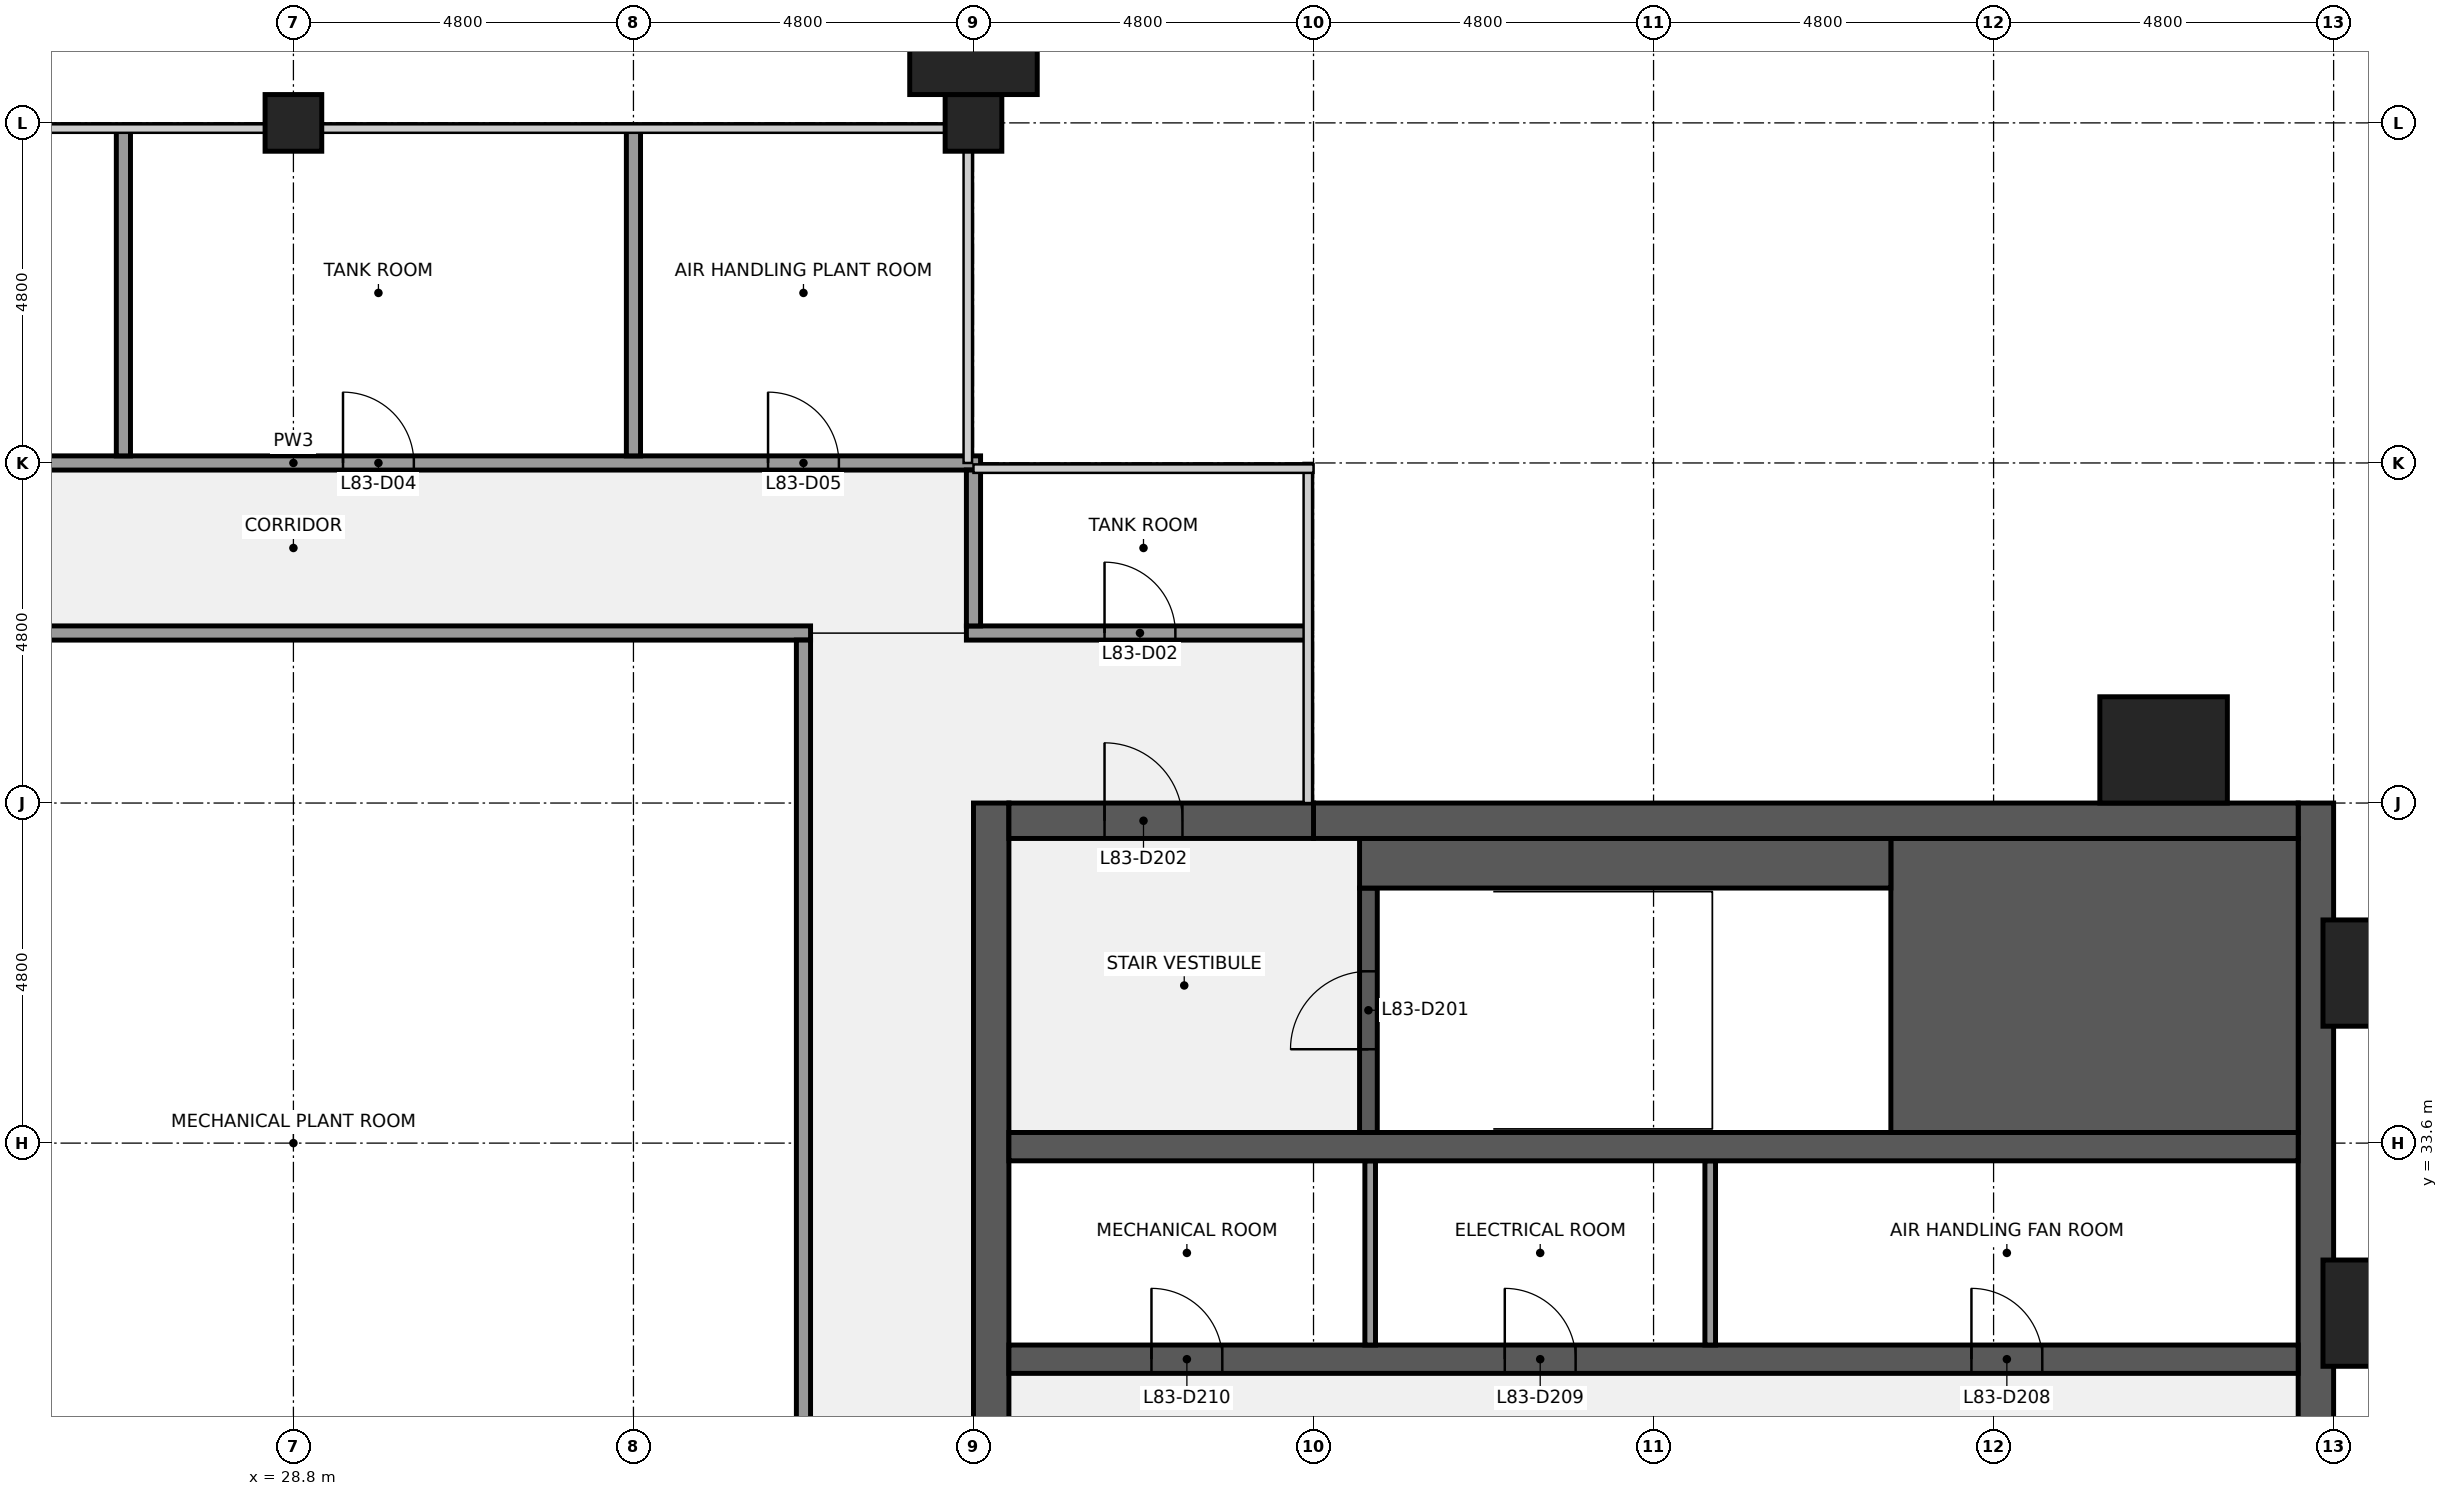
"""IFC4 building model, lengths in metres.
Left out: names, types, materials, properties, quantities, classifications, styles, units other than length and angle.
Written with IfcOpenShell. Run it as: python <this file> out.ifc"""

import sys

from ifc_helpers import new_model, si_unit, direction, frame, frame_2d, origin, origin_2d, place, context, subcontext, project, spatial, polyline, rectangle, outline, extrude, element, fill, save


model = new_model("IFC4")
c1 = context("Model", 3, precision=1e-05, world=origin(), true_north=direction((0.0, 1.0)))
c2 = subcontext(c1, "Body", "Model", "MODEL_VIEW")
j1 = project(units=[si_unit("LENGTHUNIT", "METRE"), si_unit("PLANEANGLEUNIT", "RADIAN")], contexts=[c1])
p1 = place(None, origin())
s1 = spatial("IfcSite", under=j1, at=p1, CompositionType="ELEMENT")
p2 = place(p1, origin())
s2 = spatial("IfcBuilding", under=s1, at=p2, CompositionType="ELEMENT")
p3 = place(p2, frame((0.0, 0.0, 370.3)))
s3 = spatial("IfcBuildingStorey", under=s2, at=p3, CompositionType="ELEMENT", Elevation=370.3)
for number, where, z_axis, x_axis in (
    (1, (28.8, 48.0, 0.0), (0.0, 0.0, 1.0), (1.0, 0.0, 0.0)),
    (2, (38.4, 48.0, 0.0), (0.0, 0.0, 1.0), (1.0, 0.0, 0.0)),
):
    element("IfcColumn", number, at=place(p3, frame(where, z_axis=z_axis, x_axis=x_axis)), inside=s3, PredefinedType="COLUMN", context=c2, shape_type="SweptSolid", body=[
        extrude(rectangle(XDim=0.8, YDim=0.8, at=origin_2d()), origin(), (0.0, 0.0, 1.0), 4.0),
    ])
p4 = place(p3, frame((57.35, 38.4, 0.0), z_axis=(0.0, 0.0, 1.0), x_axis=(0.0, -1.0, 0.0)))
e3 = element("IfcWall", 3, at=p4, inside=s3, PredefinedType="SHEAR", context=c2, shape_type="SweptSolid", body=[
    extrude(outline(polyline([(0.0, 0.0), (28.227, 0.0), (28.227, 2.488), (26.98, 3.75), (0.0, 3.75), (0.0, 0.0)])), frame((0.0, 0.25, 0.0), z_axis=(0.0, -1.0, 0.0), x_axis=(1.0, 0.0, 0.0)), (0.0, 0.0, 1.0), 0.5),
])
p5 = place(p3, frame((38.65, 10.173, 0.0), z_axis=(0.0, 0.0, 1.0), x_axis=(0.0, 1.0, 0.0)))
e4 = element("IfcWall", 4, at=p5, inside=s3, PredefinedType="SHEAR", context=c2, shape_type="SweptSolid", body=[
    extrude(outline(polyline([(0.0, 0.0), (28.227, 0.0), (28.227, 3.75), (1.247, 3.75), (0.0, 2.488), (0.0, 0.0)])), frame((0.0, 0.25, 0.0), z_axis=(0.0, -1.0, 0.0), x_axis=(1.0, 0.0, 0.0)), (0.0, 0.0, 1.0), 0.5),
])
p6 = place(p5, frame((8.127, 0.0, 0.0)))
e5 = element("IfcOpeningElement", 5, at=p6, cuts=e4, PredefinedType="OPENING", context=c2, shape_type="SweptSolid", body=[
    extrude(rectangle(XDim=1.8, YDim=2.1, at=frame_2d((0.9, 1.05))), frame((0.0, 0.26, 0.0), z_axis=(0.0, -1.0, 0.0), x_axis=(1.0, 0.0, 0.0)), (0.0, 0.0, 1.0), 0.52),
])
p7 = place(p5, frame((17.727, 0.0, 0.0)))
e6 = element("IfcOpeningElement", 6, at=p7, cuts=e4, PredefinedType="OPENING", context=c2, shape_type="SweptSolid", body=[
    extrude(rectangle(XDim=1.8, YDim=2.1, at=frame_2d((0.9, 1.05))), frame((0.0, 0.26, 0.0), z_axis=(0.0, -1.0, 0.0), x_axis=(1.0, 0.0, 0.0)), (0.0, 0.0, 1.0), 0.52),
])
p8 = place(p3, frame((38.9, 30.55, 0.0), z_axis=(0.0, 0.0, 1.0), x_axis=(1.0, 0.0, 0.0)))
e7 = element("IfcWall", 7, at=p8, inside=s3, PredefinedType="SHEAR", context=c2, shape_type="SweptSolid", body=[
    extrude(rectangle(XDim=18.2, YDim=0.4, at=frame_2d((9.1, 0.0))), origin(), (0.0, 0.0, 1.0), 3.75),
])
p9 = place(p8, frame((13.587, 0.0, 0.0)))
e8 = element("IfcOpeningElement", 8, at=p9, cuts=e7, PredefinedType="OPENING", context=c2, shape_type="SweptSolid", body=[
    extrude(rectangle(XDim=1.0, YDim=2.1, at=frame_2d((0.5, 1.05))), frame((0.0, 0.21, 0.0), z_axis=(0.0, -1.0, 0.0), x_axis=(1.0, 0.0, 0.0)), (0.0, 0.0, 1.0), 0.42),
])
p10 = place(p8, frame((7.0, 0.0, 0.0)))
e9 = element("IfcOpeningElement", 9, at=p10, cuts=e7, PredefinedType="OPENING", context=c2, shape_type="SweptSolid", body=[
    extrude(rectangle(XDim=1.0, YDim=2.1, at=frame_2d((0.5, 1.05))), frame((0.0, 0.21, 0.0), z_axis=(0.0, -1.0, 0.0), x_axis=(1.0, 0.0, 0.0)), (0.0, 0.0, 1.0), 0.42),
])
p11 = place(p8, frame((2.012, 0.0, 0.0)))
e10 = element("IfcOpeningElement", 10, at=p11, cuts=e7, PredefinedType="OPENING", context=c2, shape_type="SweptSolid", body=[
    extrude(rectangle(XDim=1.0, YDim=2.1, at=frame_2d((0.5, 1.05))), frame((0.0, 0.21, 0.0), z_axis=(0.0, -1.0, 0.0), x_axis=(1.0, 0.0, 0.0)), (0.0, 0.0, 1.0), 0.42),
])
for number, where, z_axis, x_axis in (
    (11, (48.8, 30.75, 0.0), (0.0, 0.0, 1.0), (0.0, 1.0, 0.0)),
    (12, (44.0, 30.75, 0.0), (0.0, 0.0, 1.0), (0.0, 1.0, 0.0)),
):
    element("IfcWall", number, at=place(p3, frame(where, z_axis=z_axis, x_axis=x_axis)), inside=s3, PredefinedType="PARTITIONING", context=c2, shape_type="SweptSolid", body=[
        extrude(rectangle(XDim=2.6, YDim=0.15, at=frame_2d((1.3, 0.0))), origin(), (0.0, 0.0, 1.0), 3.75),
    ])
p12 = place(p3, frame((38.9, 33.55, 0.0), z_axis=(0.0, 0.0, 1.0), x_axis=(1.0, 0.0, 0.0)))
e13 = element("IfcWall", 13, at=p12, inside=s3, PredefinedType="SHEAR", context=c2, shape_type="SweptSolid", body=[
    extrude(rectangle(XDim=18.2, YDim=0.4, at=frame_2d((9.1, 0.0))), origin(), (0.0, 0.0, 1.0), 3.75),
])
p13 = place(p3, frame((51.35, 35.825, 0.0), z_axis=(0.0, 0.0, 1.0), x_axis=(1.0, 0.0, 0.0)))
e14 = element("IfcWall", 14, at=p13, inside=s3, PredefinedType="SHEAR", context=c2, shape_type="SweptSolid", body=[
    extrude(rectangle(XDim=5.75, YDim=4.15, at=frame_2d((2.875, 0.0))), origin(), (0.0, 0.0, 1.0), 3.75),
])
p14 = place(p3, frame((43.975, 33.75, 0.0), z_axis=(0.0, 0.0, 1.0), x_axis=(0.0, 1.0, 0.0)))
e15 = element("IfcWall", 15, at=p14, inside=s3, PredefinedType="SHEAR", context=c2, shape_type="SweptSolid", body=[
    extrude(rectangle(XDim=3.45, YDim=0.25, at=frame_2d((1.725, 0.0))), origin(), (0.0, 0.0, 1.0), 3.75),
])
p15 = place(p14, frame((1.175, 0.0, 0.0)))
e16 = element("IfcOpeningElement", 16, at=p15, cuts=e15, PredefinedType="OPENING", context=c2, shape_type="SweptSolid", body=[
    extrude(rectangle(XDim=1.1, YDim=2.1, at=frame_2d((0.55, 1.05))), frame((0.0, 0.135, 0.0), z_axis=(0.0, -1.0, 0.0), x_axis=(1.0, 0.0, 0.0)), (0.0, 0.0, 1.0), 0.27),
])
p16 = place(p3, frame((43.85, 37.55, 0.0), z_axis=(0.0, 0.0, 1.0), x_axis=(1.0, 0.0, 0.0)))
e17 = element("IfcWall", 17, at=p16, inside=s3, PredefinedType="SHEAR", context=c2, shape_type="SweptSolid", body=[
    extrude(rectangle(XDim=7.5, YDim=0.7, at=frame_2d((3.75, 0.0))), origin(), (0.0, 0.0, 1.0), 3.75),
])
p17 = place(p3, frame((43.2, 38.15, 0.0), z_axis=(0.0, 0.0, 1.0), x_axis=(1.0, 0.0, 0.0)))
e18 = element("IfcWall", 18, at=p17, inside=s3, PredefinedType="SHEAR", context=c2, shape_type="SweptSolid", body=[
    extrude(rectangle(XDim=13.9, YDim=0.5, at=frame_2d((6.95, 0.0))), origin(), (0.0, 0.0, 1.0), 3.75),
])
p18 = place(p3, frame((38.9, 38.15, 0.0), z_axis=(0.0, 0.0, 1.0), x_axis=(1.0, 0.0, 0.0)))
e19 = element("IfcWall", 19, at=p18, inside=s3, PredefinedType="SHEAR", context=c2, shape_type="SweptSolid", body=[
    extrude(rectangle(XDim=4.3, YDim=0.5, at=frame_2d((2.15, 0.0))), origin(), (0.0, 0.0, 1.0), 3.75),
])
p19 = place(p18, frame((1.35, 0.0, 0.0)))
e20 = element("IfcOpeningElement", 20, at=p19, cuts=e19, PredefinedType="OPENING", context=c2, shape_type="SweptSolid", body=[
    extrude(rectangle(XDim=1.1, YDim=2.1, at=frame_2d((0.55, 1.05))), frame((0.0, 0.26, 0.0), z_axis=(0.0, -1.0, 0.0), x_axis=(1.0, 0.0, 0.0)), (0.0, 0.0, 1.0), 0.52),
])
p20 = place(p3, frame((21.5, 40.8, 0.0), z_axis=(0.0, 0.0, 1.0), x_axis=(1.0, 0.0, 0.0)))
e21 = element("IfcWall", 21, at=p20, inside=s3, PredefinedType="PARTITIONING", context=c2, shape_type="SweptSolid", body=[
    extrude(rectangle(XDim=14.6, YDim=0.2, at=frame_2d((7.3, 0.0))), origin(), (0.0, 0.0, 1.0), 2.759),
])
p21 = place(p3, frame((38.3, 40.8, 0.0), z_axis=(0.0, 0.0, 1.0), x_axis=(1.0, 0.0, 0.0)))
e22 = element("IfcWall", 22, at=p21, inside=s3, PredefinedType="PARTITIONING", context=c2, shape_type="SweptSolid", body=[
    extrude(rectangle(XDim=4.8, YDim=0.2, at=frame_2d((2.4, 0.0))), origin(), (0.0, 0.0, 1.0), 2.759),
])
p22 = place(p21, frame((1.95, 0.0, 0.0)))
e23 = element("IfcOpeningElement", 23, at=p22, cuts=e22, PredefinedType="OPENING", context=c2, shape_type="SweptSolid", body=[
    extrude(rectangle(XDim=1.0, YDim=2.1, at=frame_2d((0.5, 1.05))), frame((0.0, 0.11, 0.0), z_axis=(0.0, -1.0, 0.0), x_axis=(1.0, 0.0, 0.0)), (0.0, 0.0, 1.0), 0.22),
])
p23 = place(p3, frame((19.1, 43.2, 0.0), z_axis=(0.0, 0.0, 1.0), x_axis=(1.0, 0.0, 0.0)))
e24 = element("IfcWall", 24, at=p23, inside=s3, PredefinedType="PARTITIONING", context=c2, shape_type="SweptSolid", body=[
    extrude(rectangle(XDim=19.4, YDim=0.2, at=frame_2d((9.7, 0.0))), origin(), (0.0, 0.0, 1.0), 2.759),
])
p24 = place(p23, frame((3.2, 0.0, 0.0)))
e25 = element("IfcOpeningElement", 25, at=p24, cuts=e24, PredefinedType="OPENING", context=c2, shape_type="SweptSolid", body=[
    extrude(rectangle(XDim=1.0, YDim=2.1, at=frame_2d((0.5, 1.05))), frame((0.0, 0.11, 0.0), z_axis=(0.0, -1.0, 0.0), x_axis=(1.0, 0.0, 0.0)), (0.0, 0.0, 1.0), 0.22),
])
p25 = place(p23, frame((10.4, 0.0, 0.0)))
e26 = element("IfcOpeningElement", 26, at=p25, cuts=e24, PredefinedType="OPENING", context=c2, shape_type="SweptSolid", body=[
    extrude(rectangle(XDim=1.0, YDim=2.1, at=frame_2d((0.5, 1.05))), frame((0.0, 0.11, 0.0), z_axis=(0.0, -1.0, 0.0), x_axis=(1.0, 0.0, 0.0)), (0.0, 0.0, 1.0), 0.22),
])
p26 = place(p23, frame((16.4, 0.0, 0.0)))
e27 = element("IfcOpeningElement", 27, at=p26, cuts=e24, PredefinedType="OPENING", context=c2, shape_type="SweptSolid", body=[
    extrude(rectangle(XDim=1.0, YDim=2.1, at=frame_2d((0.5, 1.05))), frame((0.0, 0.11, 0.0), z_axis=(0.0, -1.0, 0.0), x_axis=(1.0, 0.0, 0.0)), (0.0, 0.0, 1.0), 0.22),
])
for number, where, z_axis, x_axis in (
    (28, (26.4, 43.3, 0.0), (0.0, 0.0, 1.0), (0.0, 1.0, 0.0)),
    (29, (33.6, 43.3, 0.0), (0.0, 0.0, 1.0), (0.0, 1.0, 0.0)),
):
    element("IfcWall", number, at=place(p3, frame(where, z_axis=z_axis, x_axis=x_axis)), inside=s3, PredefinedType="PARTITIONING", context=c2, shape_type="SweptSolid", body=[
        extrude(rectangle(XDim=4.6, YDim=0.2, at=frame_2d((2.3, 0.0))), origin(), (0.0, 0.0, 1.0), 2.759),
    ])
p27 = place(p3, frame((36.0, 26.5, 0.0), z_axis=(0.0, 0.0, 1.0), x_axis=(0.0, 1.0, 0.0)))
e30 = element("IfcWall", 30, at=p27, inside=s3, PredefinedType="PARTITIONING", context=c2, shape_type="SweptSolid", body=[
    extrude(rectangle(XDim=14.2, YDim=0.2, at=frame_2d((7.1, 0.0))), origin(), (0.0, 0.0, 1.0), 2.759),
])
p28 = place(p3, frame((38.4, 40.9, 0.0), z_axis=(0.0, 0.0, 1.0), x_axis=(0.0, 1.0, 0.0)))
e31 = element("IfcWall", 31, at=p28, inside=s3, PredefinedType="PARTITIONING", context=c2, shape_type="SweptSolid", body=[
    extrude(rectangle(XDim=2.2, YDim=0.2, at=frame_2d((1.1, 0.0))), origin(), (0.0, 0.0, 1.0), 2.759),
])
for number, where, z_axis, x_axis in (
    (32, (58.35, 31.2, 0.0), (0.0, 0.0, 1.0), (0.0, 1.0, 0.0)),
    (33, (58.35, 36.0, 0.0), (0.0, 0.0, 1.0), (0.0, 1.0, 0.0)),
    (34, (55.2, 39.15, 0.0), (0.0, 0.0, 1.0), (1.0, 0.0, 0.0)),
):
    element("IfcColumn", number, at=place(p3, frame(where, z_axis=z_axis, x_axis=x_axis)), inside=s3, PredefinedType="PILASTER", context=c2, shape_type="SweptSolid", body=[
        extrude(rectangle(XDim=1.8, YDim=1.5, at=origin_2d()), origin(), (0.0, 0.0, 1.0), 4.0),
    ])
p29 = place(p3, frame((38.4, 48.95, 0.0), z_axis=(0.0, 0.0, 1.0), x_axis=(1.0, 0.0, 0.0)))
e35 = element("IfcColumn", 35, at=p29, inside=s3, PredefinedType="PILASTER", context=c2, shape_type="SweptSolid", body=[
    extrude(rectangle(XDim=1.8, YDim=1.1, at=origin_2d()), origin(), (0.0, 0.0, 1.0), 4.0),
])
p30 = place(p15, origin())
e36 = element("IfcDoor", 36, at=p30, inside=s3, OperationType="SINGLE_SWING_LEFT", PredefinedType="DOOR", context=c2, shape_type="SweptSolid", body=[
    extrude(rectangle(XDim=1.1, YDim=2.1, at=frame_2d((0.55, 1.05))), frame((0.0, 0.025, 0.0), z_axis=(0.0, -1.0, 0.0), x_axis=(1.0, 0.0, 0.0)), (0.0, 0.0, 1.0), 0.05),
])
fill(e16, e36)
p31 = place(p19, origin())
e37 = element("IfcDoor", 37, at=p31, inside=s3, OperationType="SINGLE_SWING_LEFT", PredefinedType="DOOR", context=c2, shape_type="SweptSolid", body=[
    extrude(rectangle(XDim=1.1, YDim=2.1, at=frame_2d((0.55, 1.05))), frame((0.0, 0.025, 0.0), z_axis=(0.0, -1.0, 0.0), x_axis=(1.0, 0.0, 0.0)), (0.0, 0.0, 1.0), 0.05),
])
fill(e20, e37)
p32 = place(p9, origin())
e38 = element("IfcDoor", 38, at=p32, inside=s3, OperationType="SINGLE_SWING_LEFT", PredefinedType="DOOR", context=c2, shape_type="SweptSolid", body=[
    extrude(rectangle(XDim=1.0, YDim=2.1, at=frame_2d((0.5, 1.05))), frame((0.0, 0.025, 0.0), z_axis=(0.0, -1.0, 0.0), x_axis=(1.0, 0.0, 0.0)), (0.0, 0.0, 1.0), 0.05),
])
fill(e8, e38)
p33 = place(p10, origin())
e39 = element("IfcDoor", 39, at=p33, inside=s3, OperationType="SINGLE_SWING_LEFT", PredefinedType="DOOR", context=c2, shape_type="SweptSolid", body=[
    extrude(rectangle(XDim=1.0, YDim=2.1, at=frame_2d((0.5, 1.05))), frame((0.0, 0.025, 0.0), z_axis=(0.0, -1.0, 0.0), x_axis=(1.0, 0.0, 0.0)), (0.0, 0.0, 1.0), 0.05),
])
fill(e9, e39)
p34 = place(p11, origin())
e40 = element("IfcDoor", 40, at=p34, inside=s3, OperationType="SINGLE_SWING_LEFT", PredefinedType="DOOR", context=c2, shape_type="SweptSolid", body=[
    extrude(rectangle(XDim=1.0, YDim=2.1, at=frame_2d((0.5, 1.05))), frame((0.0, 0.025, 0.0), z_axis=(0.0, -1.0, 0.0), x_axis=(1.0, 0.0, 0.0)), (0.0, 0.0, 1.0), 0.05),
])
fill(e10, e40)
p35 = place(p22, origin())
e41 = element("IfcDoor", 41, at=p35, inside=s3, OperationType="SINGLE_SWING_LEFT", PredefinedType="DOOR", context=c2, shape_type="SweptSolid", body=[
    extrude(rectangle(XDim=1.0, YDim=2.1, at=frame_2d((0.5, 1.05))), frame((0.0, 0.025, 0.0), z_axis=(0.0, -1.0, 0.0), x_axis=(1.0, 0.0, 0.0)), (0.0, 0.0, 1.0), 0.05),
])
fill(e23, e41)
p36 = place(p25, origin())
e42 = element("IfcDoor", 42, at=p36, inside=s3, OperationType="SINGLE_SWING_LEFT", PredefinedType="DOOR", context=c2, shape_type="SweptSolid", body=[
    extrude(rectangle(XDim=1.0, YDim=2.1, at=frame_2d((0.5, 1.05))), frame((0.0, 0.025, 0.0), z_axis=(0.0, -1.0, 0.0), x_axis=(1.0, 0.0, 0.0)), (0.0, 0.0, 1.0), 0.05),
])
fill(e26, e42)
p37 = place(p26, origin())
e43 = element("IfcDoor", 43, at=p37, inside=s3, OperationType="SINGLE_SWING_LEFT", PredefinedType="DOOR", context=c2, shape_type="SweptSolid", body=[
    extrude(rectangle(XDim=1.0, YDim=2.1, at=frame_2d((0.5, 1.05))), frame((0.0, 0.025, 0.0), z_axis=(0.0, -1.0, 0.0), x_axis=(1.0, 0.0, 0.0)), (0.0, 0.0, 1.0), 0.05),
])
fill(e27, e43)
save(model, sys.argv[1])
